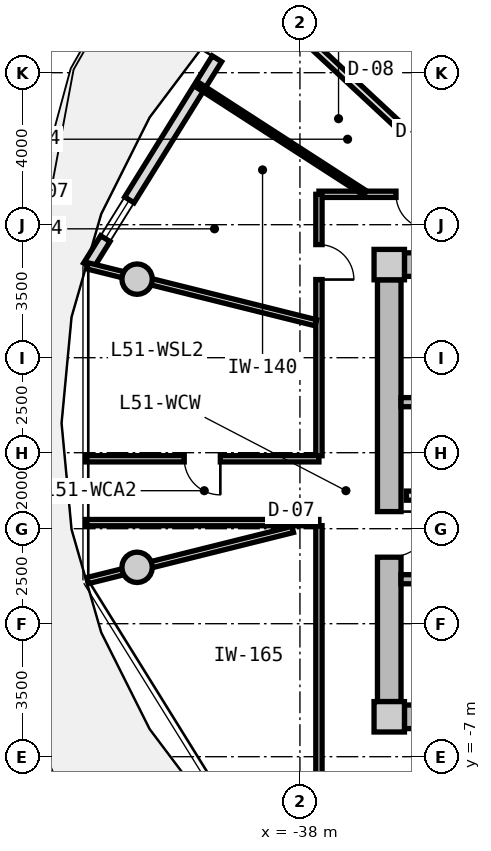
"""IFC4 building model, lengths in metres.
Left out: names, types, materials, properties, quantities, classifications, styles, units other than length and angle.
Written with IfcOpenShell. Run it as: python <this file> out.ifc"""

import sys

from ifc_helpers import new_model, si_unit, direction, frame, frame_2d, origin, origin_2d, place, context, subcontext, project, spatial, rectangle, circle, extrude, source, transform, mapped, element, fill, save


model = new_model("IFC4")
c1 = context("Model", 3, precision=1e-05, world=origin(), true_north=direction((0.0, 1.0)))
c2 = subcontext(c1, "Body", "Model", "MODEL_VIEW")
j1 = project(units=[si_unit("LENGTHUNIT", "METRE"), si_unit("PLANEANGLEUNIT", "RADIAN")], contexts=[c1])
p1 = place(None, origin())
s1 = spatial("IfcSite", under=j1, at=p1, CompositionType="ELEMENT")
p2 = place(p1, origin())
s2 = spatial("IfcBuilding", under=s1, at=p2, CompositionType="ELEMENT")
p3 = place(p2, frame((0.0, 0.0, 164.8)))
s3 = spatial("IfcBuildingStorey", under=s2, at=p3, CompositionType="ELEMENT", Elevation=164.8)
m1 = source(origin(), c2, "Body", "SweptSolid", [
    extrude(rectangle(XDim=0.8, YDim=0.8, at=origin_2d()), origin(), (0.0, 0.0, 1.0), 3.05),
])
for number, where, z_axis, x_axis in (
    (1, (-35.65, -5.95, 0.0), (0.0, 0.0, 1.0), (1.0, 0.0, 0.0)),
    (2, (-35.65, 5.95, 0.0), (0.0, 0.0, 1.0), (1.0, 0.0, 0.0)),
):
    element("IfcColumn", number, at=place(p3, frame(where, z_axis=z_axis, x_axis=x_axis)), inside=s3, PredefinedType="COLUMN", context=c2, shape_type="MappedRepresentation", body=[
        mapped(m1, transform((0.0, 0.0, 0.0), x_axis=(1.0, 0.0, 0.0), y_axis=(0.0, 1.0, 0.0), z_axis=(0.0, 0.0, 1.0), scale=1.0)),
    ])
m2 = source(origin(), c2, "Body", "SweptSolid", [
    extrude(rectangle(XDim=14.5, YDim=0.62, at=frame_2d((7.25, 0.0))), origin(), (0.0, 0.0, 1.0), 2.81),
])
for number, where, z_axis, x_axis in (
    (3, (-35.25, 5.95, 0.0), (0.0, 0.0, 1.0), (1.0, 0.0, 0.0)),
    (4, (-20.75, -5.95, 0.0), (0.0, 0.0, 1.0), (-1.0, 0.0, 0.0)),
):
    element("IfcWall", number, at=place(p3, frame(where, z_axis=z_axis, x_axis=x_axis)), inside=s3, PredefinedType="SHEAR", context=c2, shape_type="MappedRepresentation", body=[
        mapped(m2, transform((0.0, 0.0, 0.0), x_axis=(1.0, 0.0, 0.0), y_axis=(0.0, 1.0, 0.0), z_axis=(0.0, 0.0, 1.0), scale=1.0)),
    ])
m3 = source(origin(), c2, "Body", "SweptSolid", [
    extrude(rectangle(XDim=11.1, YDim=0.62, at=frame_2d((5.55, 0.0))), origin(), (0.0, 0.0, 1.0), 2.81),
])
p4 = place(p3, frame((-35.65, -5.55, 0.0), z_axis=(0.0, 0.0, 1.0), x_axis=(0.0, 1.0, 0.0)))
e5 = element("IfcWall", 5, at=p4, inside=s3, PredefinedType="SHEAR", context=c2, shape_type="MappedRepresentation", body=[
    mapped(m3, transform((0.0, 0.0, 0.0), x_axis=(1.0, 0.0, 0.0), y_axis=(0.0, 1.0, 0.0), z_axis=(0.0, 0.0, 1.0), scale=1.0)),
])
p5 = place(p4, frame((3.8, 0.0, 0.0)))
e6 = element("IfcOpeningElement", 6, at=p5, cuts=e5, PredefinedType="OPENING", context=c2, shape_type="SweptSolid", body=[
    extrude(rectangle(XDim=1.2, YDim=2.15, at=frame_2d((0.6, 1.075))), frame((0.0, 0.32, 0.0), z_axis=(0.0, -1.0, 0.0), x_axis=(1.0, 0.0, 0.0)), (0.0, 0.0, 1.0), 0.64),
])
m4 = source(origin(), c2, "Body", "SweptSolid", [
    extrude(circle(Radius=0.4, at=origin_2d()), origin(), (0.0, 0.0, 1.0), 3.05),
])
for number, where, z_axis, x_axis in (
    (7, (-42.285, 5.567, 0.0), (0.0, 0.0, 1.0), (1.0, 0.0, 0.0)),
    (8, (-42.285, -2.016, 0.0), (0.0, 0.0, 1.0), (1.0, 0.0, 0.0)),
):
    element("IfcColumn", number, at=place(p3, frame(where, z_axis=z_axis, x_axis=x_axis)), inside=s3, PredefinedType="COLUMN", context=c2, shape_type="MappedRepresentation", body=[
        mapped(m4, transform((0.0, 0.0, 0.0), x_axis=(1.0, 0.0, 0.0), y_axis=(0.0, 1.0, 0.0), z_axis=(0.0, 0.0, 1.0), scale=1.0)),
    ])
m5 = source(origin(), c2, "Body", "SweptSolid", [
    extrude(rectangle(XDim=8.431, YDim=0.29, at=frame_2d((4.216, 0.0))), origin(), (0.0, 0.0, 1.0), 2.81),
])
p6 = place(p3, frame((-43.57, 5.911, 0.0), z_axis=(0.0, 0.0, 1.0), x_axis=(0.527377998418, 0.849630770855, 0.0)))
e9 = element("IfcWall", 9, at=p6, inside=s3, PredefinedType="SOLIDWALL", context=c2, shape_type="MappedRepresentation", body=[
    mapped(m5, transform((0.0, 0.0, 0.0), x_axis=(1.0, 0.0, 0.0), y_axis=(0.0, 1.0, 0.0), z_axis=(0.0, 0.0, 1.0), scale=1.0)),
])
p7 = place(p6, frame((6.42, 0.0, 0.0)))
e10 = element("IfcOpeningElement", 10, at=p7, cuts=e9, PredefinedType="OPENING", context=c2, shape_type="SweptSolid", body=[
    extrude(rectangle(XDim=1.15, YDim=2.25, at=frame_2d((0.575, 1.125))), frame((0.0, 0.155, 0.0), z_axis=(0.0, -1.0, 0.0), x_axis=(1.0, 0.0, 0.0)), (0.0, 0.0, 1.0), 0.31),
])
p8 = place(p6, frame((0.85, 0.0, 0.85)))
e11 = element("IfcOpeningElement", 11, at=p8, cuts=e9, PredefinedType="OPENING", context=c2, shape_type="SweptSolid", body=[
    extrude(rectangle(XDim=1.2, YDim=1.5, at=frame_2d((0.6, 0.75))), frame((0.0, 0.155, 0.0), z_axis=(0.0, -1.0, 0.0), x_axis=(1.0, 0.0, 0.0)), (0.0, 0.0, 1.0), 0.31),
])
m6 = source(origin(), c2, "Body", "SweptSolid", [
    extrude(rectangle(XDim=7.88, YDim=0.24, at=frame_2d((3.94, 0.0))), origin(), (0.0, 0.0, 1.0), 2.81),
])
p9 = place(p3, frame((-35.34, 2.33, 0.0), z_axis=(0.0, 0.0, 1.0), x_axis=(1.0, 0.0, 0.0)))
e12 = element("IfcWall", 12, at=p9, inside=s3, PredefinedType="PARTITIONING", context=c2, shape_type="MappedRepresentation", body=[
    mapped(m6, transform((0.0, 0.0, 0.0), x_axis=(1.0, 0.0, 0.0), y_axis=(0.0, 1.0, 0.0), z_axis=(0.0, 0.0, 1.0), scale=1.0)),
])
p10 = place(p3, frame((-35.34, -2.33, 0.0), z_axis=(0.0, 0.0, 1.0), x_axis=(1.0, 0.0, 0.0)))
e13 = element("IfcWall", 13, at=p10, inside=s3, PredefinedType="PARTITIONING", context=c2, shape_type="MappedRepresentation", body=[
    mapped(m6, transform((0.0, 0.0, 0.0), x_axis=(1.0, 0.0, 0.0), y_axis=(0.0, 1.0, 0.0), z_axis=(0.0, 0.0, 1.0), scale=1.0)),
])
p11 = place(p10, frame((1.0, 0.0, 0.0)))
e14 = element("IfcOpeningElement", 14, at=p11, cuts=e13, PredefinedType="OPENING", context=c2, shape_type="SweptSolid", body=[
    extrude(rectangle(XDim=1.1, YDim=2.15, at=frame_2d((0.55, 1.075))), frame((0.0, 0.13, 0.0), z_axis=(0.0, -1.0, 0.0), x_axis=(1.0, 0.0, 0.0)), (0.0, 0.0, 1.0), 0.26),
])
m7 = source(origin(), c2, "Body", "SweptSolid", [
    extrude(rectangle(XDim=7.62, YDim=0.24, at=frame_2d((3.81, 0.0))), origin(), (0.0, 0.0, 1.0), 2.795),
])
p12 = place(p3, frame((-35.2, -0.13, 0.0), z_axis=(0.0, 0.0, 1.0), x_axis=(1.0, 0.0, 0.0)))
e15 = element("IfcWall", 15, at=p12, inside=s3, PredefinedType="PARTITIONING", context=c2, shape_type="MappedRepresentation", body=[
    mapped(m7, transform((0.0, 0.0, 0.0), x_axis=(1.0, 0.0, 0.0), y_axis=(0.0, 1.0, 0.0), z_axis=(0.0, 0.0, 1.0), scale=1.0)),
])
p13 = place(p12, frame((6.22, 0.0, 0.0)))
e16 = element("IfcOpeningElement", 16, at=p13, cuts=e15, PredefinedType="OPENING", context=c2, shape_type="SweptSolid", body=[
    extrude(rectangle(XDim=1.0, YDim=2.1, at=frame_2d((0.5, 1.05))), frame((0.0, 0.13, 0.0), z_axis=(0.0, -1.0, 0.0), x_axis=(1.0, 0.0, 0.0)), (0.0, 0.0, 1.0), 0.26),
])
p14 = place(p12, frame((2.4, 0.0, 0.0)))
e17 = element("IfcOpeningElement", 17, at=p14, cuts=e15, PredefinedType="OPENING", context=c2, shape_type="SweptSolid", body=[
    extrude(rectangle(XDim=1.0, YDim=2.1, at=frame_2d((0.5, 1.05))), frame((0.0, 0.13, 0.0), z_axis=(0.0, -1.0, 0.0), x_axis=(1.0, 0.0, 0.0)), (0.0, 0.0, 1.0), 0.26),
])
m8 = source(origin(), c2, "Body", "SweptSolid", [
    extrude(rectangle(XDim=8.719, YDim=0.165, at=frame_2d((4.36, 0.0))), origin(), (0.0, 0.0, 1.0), 2.795),
])
p15 = place(p3, frame((-37.5, 7.8, 0.0), z_axis=(0.0, 0.0, 1.0), x_axis=(1.0, 0.0, 0.0)))
e18 = element("IfcWall", 18, at=p15, inside=s3, PredefinedType="PARTITIONING", context=c2, shape_type="MappedRepresentation", body=[
    mapped(m8, transform((0.0, 0.0, 0.0), x_axis=(1.0, 0.0, 0.0), y_axis=(0.0, 1.0, 0.0), z_axis=(0.0, 0.0, 1.0), scale=1.0)),
])
p16 = place(p15, frame((7.073, 0.0, 0.0)))
e19 = element("IfcOpeningElement", 19, at=p16, cuts=e18, PredefinedType="OPENING", context=c2, shape_type="SweptSolid", body=[
    extrude(rectangle(XDim=1.05, YDim=2.15, at=frame_2d((0.525, 1.075))), frame((0.0, 0.093, 0.0), z_axis=(0.0, -1.0, 0.0), x_axis=(1.0, 0.0, 0.0)), (0.0, 0.0, 1.0), 0.185),
])
p17 = place(p15, frame((4.785, 0.0, 0.0)))
e20 = element("IfcOpeningElement", 20, at=p17, cuts=e18, PredefinedType="OPENING", context=c2, shape_type="SweptSolid", body=[
    extrude(rectangle(XDim=1.05, YDim=2.15, at=frame_2d((0.525, 1.075))), frame((0.0, 0.093, 0.0), z_axis=(0.0, -1.0, 0.0), x_axis=(1.0, 0.0, 0.0)), (0.0, 0.0, 1.0), 0.185),
])
p18 = place(p15, frame((2.028, 0.0, 0.0)))
e21 = element("IfcOpeningElement", 21, at=p18, cuts=e18, PredefinedType="OPENING", context=c2, shape_type="SweptSolid", body=[
    extrude(rectangle(XDim=0.92, YDim=2.1, at=frame_2d((0.46, 1.05))), frame((0.0, 0.093, 0.0), z_axis=(0.0, -1.0, 0.0), x_axis=(1.0, 0.0, 0.0)), (0.0, 0.0, 1.0), 0.185),
])
m9 = source(origin(), c2, "Body", "SweptSolid", [
    extrude(rectangle(XDim=6.88, YDim=0.165, at=frame_2d((3.44, 0.0))), origin(), (0.0, 0.0, 1.0), 2.795),
])
p19 = place(p3, frame((-37.5, -7.8, 0.0), z_axis=(0.0, 0.0, 1.0), x_axis=(0.0, 1.0, 0.0)))
e22 = element("IfcWall", 22, at=p19, inside=s3, PredefinedType="PARTITIONING", context=c2, shape_type="MappedRepresentation", body=[
    mapped(m9, transform((0.0, 0.0, 0.0), x_axis=(1.0, 0.0, 0.0), y_axis=(0.0, 1.0, 0.0), z_axis=(0.0, 0.0, 1.0), scale=1.0)),
])
p20 = place(p3, frame((-37.5, 0.92, 0.0), z_axis=(0.0, 0.0, 1.0), x_axis=(0.0, 1.0, 0.0)))
e23 = element("IfcWall", 23, at=p20, inside=s3, PredefinedType="PARTITIONING", context=c2, shape_type="MappedRepresentation", body=[
    mapped(m9, transform((0.0, 0.0, 0.0), x_axis=(1.0, 0.0, 0.0), y_axis=(0.0, 1.0, 0.0), z_axis=(0.0, 0.0, 1.0), scale=1.0)),
])
p21 = place(p20, frame((4.636, 0.0, 0.0)))
e24 = element("IfcOpeningElement", 24, at=p21, cuts=e23, PredefinedType="OPENING", context=c2, shape_type="SweptSolid", body=[
    extrude(rectangle(XDim=0.92, YDim=2.1, at=frame_2d((0.46, 1.05))), frame((0.0, 0.093, 0.0), z_axis=(0.0, -1.0, 0.0), x_axis=(1.0, 0.0, 0.0)), (0.0, 0.0, 1.0), 0.185),
])
m10 = source(origin(), c2, "Body", "SweptSolid", [
    extrude(rectangle(XDim=6.193, YDim=0.165, at=frame_2d((3.096, 0.0))), origin(), (0.0, 0.0, 1.0), 2.345),
])
p22 = place(p3, frame((-37.58, 4.419, 0.0), z_axis=(0.0, 0.0, 1.0), x_axis=(-0.970309243466, 0.241867674657, 0.0)))
e25 = element("IfcWall", 25, at=p22, inside=s3, PredefinedType="PARTITIONING", context=c2, shape_type="MappedRepresentation", body=[
    mapped(m10, transform((0.0, 0.0, 0.0), x_axis=(1.0, 0.0, 0.0), y_axis=(0.0, 1.0, 0.0), z_axis=(0.0, 0.0, 1.0), scale=1.0)),
])
m11 = source(origin(), c2, "Body", "SweptSolid", [
    extrude(rectangle(XDim=5.564, YDim=0.165, at=frame_2d((2.782, 0.0))), origin(), (0.0, 0.0, 1.0), 2.345),
])
p23 = place(p3, frame((-38.19, -1.02, 0.0), z_axis=(0.0, 0.0, 1.0), x_axis=(-0.97031260977, -0.241854169533, 0.0)))
e26 = element("IfcWall", 26, at=p23, inside=s3, PredefinedType="PARTITIONING", context=c2, shape_type="MappedRepresentation", body=[
    mapped(m11, transform((0.0, 0.0, 0.0), x_axis=(1.0, 0.0, 0.0), y_axis=(0.0, 1.0, 0.0), z_axis=(0.0, 0.0, 1.0), scale=1.0)),
])
m12 = source(origin(), c2, "Body", "SweptSolid", [
    extrude(rectangle(XDim=6.139, YDim=0.165, at=frame_2d((3.069, 0.0))), origin(), (0.0, 0.0, 1.0), 2.795),
])
p24 = place(p3, frame((-43.639, 0.84, 0.0), z_axis=(0.0, 0.0, 1.0), x_axis=(1.0, 0.0, 0.0)))
e27 = element("IfcWall", 27, at=p24, inside=s3, PredefinedType="PARTITIONING", context=c2, shape_type="MappedRepresentation", body=[
    mapped(m12, transform((0.0, 0.0, 0.0), x_axis=(1.0, 0.0, 0.0), y_axis=(0.0, 1.0, 0.0), z_axis=(0.0, 0.0, 1.0), scale=1.0)),
])
p25 = place(p24, frame((2.594, 0.0, 0.0)))
e28 = element("IfcOpeningElement", 28, at=p25, cuts=e27, PredefinedType="OPENING", context=c2, shape_type="SweptSolid", body=[
    extrude(rectangle(XDim=0.95, YDim=2.1, at=frame_2d((0.475, 1.05))), frame((0.0, 0.093, 0.0), z_axis=(0.0, -1.0, 0.0), x_axis=(1.0, 0.0, 0.0)), (0.0, 0.0, 1.0), 0.185),
])
p26 = place(p3, frame((-37.5, -0.84, 0.0), z_axis=(0.0, 0.0, 1.0), x_axis=(-1.0, 0.0, 0.0)))
e29 = element("IfcWall", 29, at=p26, inside=s3, PredefinedType="PARTITIONING", context=c2, shape_type="MappedRepresentation", body=[
    mapped(m12, transform((0.0, 0.0, 0.0), x_axis=(1.0, 0.0, 0.0), y_axis=(0.0, 1.0, 0.0), z_axis=(0.0, 0.0, 1.0), scale=1.0)),
])
m13 = source(origin(), c2, "Body", "SweptSolid", [
    extrude(rectangle(XDim=7.648, YDim=0.19, at=frame_2d((3.824, 0.0))), origin(), (0.0, 0.0, 1.0), 2.345),
])
p27 = place(p3, frame((-33.538, 7.88, 0.0), z_axis=(0.0, 0.0, 1.0), x_axis=(-0.732167856666, 0.681124239522, 0.0)))
e30 = element("IfcWall", 30, at=p27, inside=s3, PredefinedType="PARTITIONING", context=c2, shape_type="MappedRepresentation", body=[
    mapped(m13, transform((0.0, 0.0, 0.0), x_axis=(1.0, 0.0, 0.0), y_axis=(0.0, 1.0, 0.0), z_axis=(0.0, 0.0, 1.0), scale=1.0)),
])
m14 = source(origin(), c2, "Body", "SweptSolid", [
    extrude(rectangle(XDim=8.638, YDim=0.19, at=frame_2d((4.319, 0.0))), origin(), (0.0, 0.0, 1.0), 2.795),
])
p28 = place(p3, frame((-30.711, 7.83, 0.0), z_axis=(0.0, 0.0, 1.0), x_axis=(-0.529150133108, 0.848528217935, 0.0)))
e31 = element("IfcWall", 31, at=p28, inside=s3, PredefinedType="PARTITIONING", context=c2, shape_type="MappedRepresentation", body=[
    mapped(m14, transform((0.0, 0.0, 0.0), x_axis=(1.0, 0.0, 0.0), y_axis=(0.0, 1.0, 0.0), z_axis=(0.0, 0.0, 1.0), scale=1.0)),
])
m15 = source(origin(), c2, "Body", "SweptSolid", [
    extrude(rectangle(XDim=5.197, YDim=0.14, at=frame_2d((2.598, 0.0))), origin(), (0.0, 0.0, 1.0), 2.795),
])
p29 = place(p3, frame((-36.286, 7.83, 0.0), z_axis=(0.0, 0.0, 1.0), x_axis=(-0.839929187515, 0.542696010637, 0.0)))
e32 = element("IfcWall", 32, at=p29, inside=s3, PredefinedType="PARTITIONING", context=c2, shape_type="MappedRepresentation", body=[
    mapped(m15, transform((0.0, 0.0, 0.0), x_axis=(1.0, 0.0, 0.0), y_axis=(0.0, 1.0, 0.0), z_axis=(0.0, 0.0, 1.0), scale=1.0)),
])
m16 = source(origin(), c2, "Body", "SweptSolid", [
    extrude(rectangle(XDim=1.15, YDim=2.25, at=frame_2d((0.575, 1.125))), frame((0.0, 0.025, 0.0), z_axis=(0.0, -1.0, 0.0), x_axis=(1.0, 0.0, 0.0)), (0.0, 0.0, 1.0), 0.05),
])
p30 = place(p7, origin())
e33 = element("IfcDoor", 33, at=p30, inside=s3, OperationType="SINGLE_SWING_LEFT", PredefinedType="DOOR", context=c2, shape_type="MappedRepresentation", body=[
    mapped(m16, transform((0.0, 0.0, 0.0), x_axis=(1.0, 0.0, 0.0), y_axis=(0.0, 1.0, 0.0), z_axis=(0.0, 0.0, 1.0), scale=1.0)),
])
fill(e10, e33)
m17 = source(origin(), c2, "Body", "SweptSolid", [
    extrude(rectangle(XDim=1.2, YDim=1.5, at=frame_2d((0.6, 0.75))), frame((0.0, 0.03, 0.0), z_axis=(0.0, -1.0, 0.0), x_axis=(1.0, 0.0, 0.0)), (0.0, 0.0, 1.0), 0.06),
])
p31 = place(p8, origin())
e34 = element("IfcWindow", 34, at=p31, inside=s3, PartitioningType="SINGLE_PANEL", PredefinedType="WINDOW", context=c2, shape_type="MappedRepresentation", body=[
    mapped(m17, transform((0.0, 0.0, 0.0), x_axis=(1.0, 0.0, 0.0), y_axis=(0.0, 1.0, 0.0), z_axis=(0.0, 0.0, 1.0), scale=1.0)),
])
fill(e11, e34)
m18 = source(origin(), c2, "Body", "SweptSolid", [
    extrude(rectangle(XDim=1.2, YDim=2.15, at=frame_2d((0.6, 1.075))), frame((0.0, 0.025, 0.0), z_axis=(0.0, -1.0, 0.0), x_axis=(1.0, 0.0, 0.0)), (0.0, 0.0, 1.0), 0.05),
])
p32 = place(p5, frame((1.2, 0.0, 0.0), z_axis=(0.0, 0.0, 1.0), x_axis=(-1.0, 0.0, 0.0)))
e35 = element("IfcDoor", 35, at=p32, inside=s3, OperationType="SINGLE_SWING_LEFT", PredefinedType="DOOR", context=c2, shape_type="MappedRepresentation", body=[
    mapped(m18, transform((0.0, 0.0, 0.0), x_axis=(1.0, 0.0, 0.0), y_axis=(0.0, 1.0, 0.0), z_axis=(0.0, 0.0, 1.0), scale=1.0)),
])
fill(e6, e35)
m19 = source(origin(), c2, "Body", "SweptSolid", [
    extrude(rectangle(XDim=0.95, YDim=2.1, at=frame_2d((0.475, 1.05))), frame((0.0, 0.025, 0.0), z_axis=(0.0, -1.0, 0.0), x_axis=(1.0, 0.0, 0.0)), (0.0, 0.0, 1.0), 0.05),
])
p33 = place(p25, frame((0.95, 0.0, 0.0), z_axis=(0.0, 0.0, 1.0), x_axis=(-1.0, 0.0, 0.0)))
e36 = element("IfcDoor", 36, at=p33, inside=s3, OperationType="SINGLE_SWING_LEFT", PredefinedType="DOOR", context=c2, shape_type="MappedRepresentation", body=[
    mapped(m19, transform((0.0, 0.0, 0.0), x_axis=(1.0, 0.0, 0.0), y_axis=(0.0, 1.0, 0.0), z_axis=(0.0, 0.0, 1.0), scale=1.0)),
])
fill(e28, e36)
m20 = source(origin(), c2, "Body", "SweptSolid", [
    extrude(rectangle(XDim=0.92, YDim=2.1, at=frame_2d((0.46, 1.05))), frame((0.0, 0.025, 0.0), z_axis=(0.0, -1.0, 0.0), x_axis=(1.0, 0.0, 0.0)), (0.0, 0.0, 1.0), 0.05),
])
p34 = place(p18, frame((0.92, 0.0, 0.0), z_axis=(0.0, 0.0, 1.0), x_axis=(-1.0, 0.0, 0.0)))
e37 = element("IfcDoor", 37, at=p34, inside=s3, OperationType="SINGLE_SWING_LEFT", PredefinedType="DOOR", context=c2, shape_type="MappedRepresentation", body=[
    mapped(m20, transform((0.0, 0.0, 0.0), x_axis=(1.0, 0.0, 0.0), y_axis=(0.0, 1.0, 0.0), z_axis=(0.0, 0.0, 1.0), scale=1.0)),
])
fill(e21, e37)
p35 = place(p21, frame((0.92, 0.0, 0.0), z_axis=(0.0, 0.0, 1.0), x_axis=(-1.0, 0.0, 0.0)))
e38 = element("IfcDoor", 38, at=p35, inside=s3, OperationType="SINGLE_SWING_RIGHT", PredefinedType="DOOR", context=c2, shape_type="MappedRepresentation", body=[
    mapped(m20, transform((0.0, 0.0, 0.0), x_axis=(1.0, 0.0, 0.0), y_axis=(0.0, 1.0, 0.0), z_axis=(0.0, 0.0, 1.0), scale=1.0)),
])
fill(e24, e38)
save(model, sys.argv[1])
